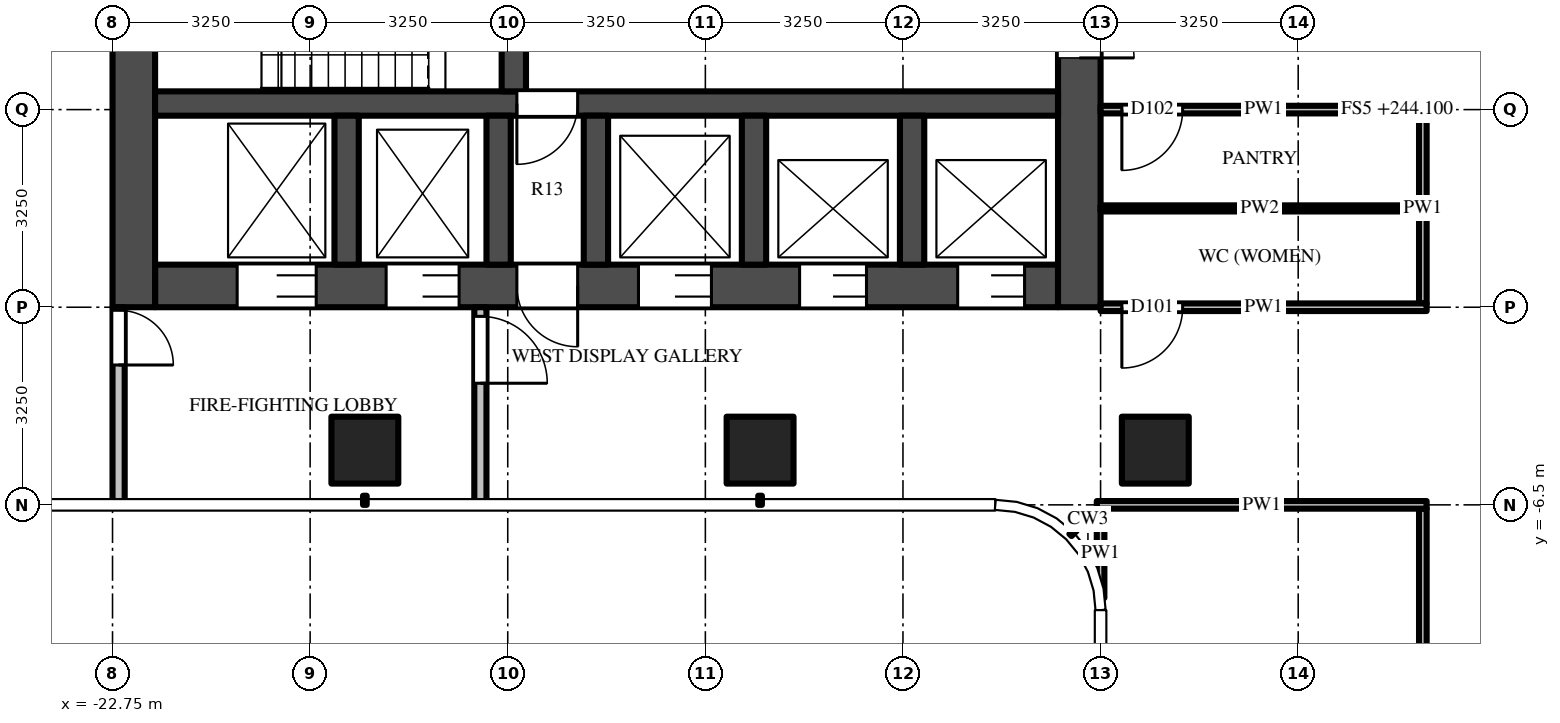
"""IFC4 building model, lengths in metres.
Left out: names, types, materials, properties, quantities, classifications, styles, units other than length and angle.
Written with IfcOpenShell. Run it as: python <this file> out.ifc"""

import sys

from ifc_helpers import new_model, si_unit, direction, frame, frame_2d, origin, origin_2d, place, context, subcontext, project, spatial, rectangle, extrude, source, transform, mapped, element, fill, save


model = new_model("IFC4")
c1 = context("Model", 3, precision=1e-05, world=origin(), true_north=direction((0.0, 1.0)))
c2 = subcontext(c1, "Body", "Model", "MODEL_VIEW")
j1 = project(units=[si_unit("LENGTHUNIT", "METRE"), si_unit("PLANEANGLEUNIT", "RADIAN")], contexts=[c1])
p1 = place(None, origin())
s1 = spatial("IfcSite", under=j1, at=p1, CompositionType="ELEMENT")
p2 = place(p1, origin())
s2 = spatial("IfcBuilding", under=s1, at=p2, CompositionType="ELEMENT")
p3 = place(p2, frame((0.0, 0.0, 244.1)))
s3 = spatial("IfcBuildingStorey", under=s2, at=p3, CompositionType="ELEMENT", Elevation=244.1)
m1 = source(origin(), c2, "Body", "SweptSolid", [
    extrude(rectangle(XDim=1.1, YDim=1.1, at=origin_2d()), origin(), (0.0, 0.0, 1.0), 3.9),
])
for number, where, z_axis, x_axis in (
    (1, (-5.6, -5.6, 0.0), (0.0, 0.0, 1.0), (1.0, 0.0, 0.0)),
    (2, (-12.1, -5.6, 0.0), (0.0, 0.0, 1.0), (1.0, 0.0, 0.0)),
    (3, (-18.6, -5.6, 0.0), (0.0, 0.0, 1.0), (1.0, 0.0, 0.0)),
):
    element("IfcColumn", number, at=place(p3, frame(where, z_axis=z_axis, x_axis=x_axis)), inside=s3, PredefinedType="COLUMN", context=c2, shape_type="MappedRepresentation", body=[
        mapped(m1, transform((0.0, 0.0, 0.0))),
    ])
m2 = source(origin(), c2, "Body", "SweptSolid", [
    extrude(rectangle(XDim=14.85, YDim=0.7, at=frame_2d((7.425, 0.0))), origin(), (0.0, 0.0, 1.0), 3.7),
])
p4 = place(p3, frame((-7.2, -2.9, 0.0), z_axis=(0.0, 0.0, 1.0), x_axis=(-1.0, 0.0, 0.0)))
e4 = element("IfcWall", 4, at=p4, inside=s3, PredefinedType="SHEAR", context=c2, shape_type="MappedRepresentation", body=[
    mapped(m2, transform((0.0, 0.0, 0.0))),
])
m3 = source(origin(), c2, "Body", "SweptSolid", [
    extrude(rectangle(XDim=1.1, YDim=2.1, at=frame_2d((0.55, 1.05))), frame((0.0, 0.36, 0.0), z_axis=(0.0, -1.0, 0.0), x_axis=(1.0, 0.0, 0.0)), (0.0, 0.0, 1.0), 0.72),
])
p5 = place(p4, frame((0.55, 0.0, 0.0)))
e5 = element("IfcOpeningElement", 5, at=p5, cuts=e4, PredefinedType="OPENING", context=c2, shape_type="MappedRepresentation", body=[
    mapped(m3, transform((0.0, 0.0, 0.0))),
])
p6 = place(p4, frame((3.15, 0.0, 0.0)))
e6 = element("IfcOpeningElement", 6, at=p6, cuts=e4, PredefinedType="OPENING", context=c2, shape_type="MappedRepresentation", body=[
    mapped(m3, transform((0.0, 0.0, 0.0))),
])
m4 = source(origin(), c2, "Body", "SweptSolid", [
    extrude(rectangle(XDim=1.2, YDim=2.1, at=frame_2d((0.6, 1.05))), frame((0.0, 0.36, 0.0), z_axis=(0.0, -1.0, 0.0), x_axis=(1.0, 0.0, 0.0)), (0.0, 0.0, 1.0), 0.72),
])
p7 = place(p4, frame((5.7, 0.0, 0.0)))
e7 = element("IfcOpeningElement", 7, at=p7, cuts=e4, PredefinedType="OPENING", context=c2, shape_type="MappedRepresentation", body=[
    mapped(m4, transform((0.0, 0.0, 0.0))),
])
m5 = source(origin(), c2, "Body", "SweptSolid", [
    extrude(rectangle(XDim=1.3, YDim=2.1, at=frame_2d((0.65, 1.05))), frame((0.0, 0.36, 0.0), z_axis=(0.0, -1.0, 0.0), x_axis=(1.0, 0.0, 0.0)), (0.0, 0.0, 1.0), 0.72),
])
p8 = place(p4, frame((12.2, 0.0, 0.0)))
e8 = element("IfcOpeningElement", 8, at=p8, cuts=e4, PredefinedType="OPENING", context=c2, shape_type="MappedRepresentation", body=[
    mapped(m5, transform((0.0, 0.0, 0.0))),
])
p9 = place(p4, frame((9.85, 0.0, 0.0)))
e9 = element("IfcOpeningElement", 9, at=p9, cuts=e4, PredefinedType="OPENING", context=c2, shape_type="MappedRepresentation", body=[
    mapped(m4, transform((0.0, 0.0, 0.0))),
])
m6 = source(origin(), c2, "Body", "SweptSolid", [
    extrude(rectangle(XDim=1.0, YDim=2.1, at=frame_2d((0.5, 1.05))), frame((0.0, 0.36, 0.0), z_axis=(0.0, -1.0, 0.0), x_axis=(1.0, 0.0, 0.0)), (0.0, 0.0, 1.0), 0.72),
])
p10 = place(p4, frame((7.9, 0.0, 0.0)))
e10 = element("IfcOpeningElement", 10, at=p10, cuts=e4, PredefinedType="OPENING", context=c2, shape_type="MappedRepresentation", body=[
    mapped(m6, transform((0.0, 0.0, 0.0))),
])
m7 = source(origin(), c2, "Body", "SweptSolid", [
    extrude(rectangle(XDim=9.05, YDim=0.7, at=frame_2d((4.525, 0.0))), origin(), (0.0, 0.0, 1.0), 3.7),
])
p11 = place(p3, frame((-6.85, 5.8, 0.0), z_axis=(0.0, 0.0, 1.0), x_axis=(0.0, -1.0, 0.0)))
e11 = element("IfcWall", 11, at=p11, inside=s3, PredefinedType="SHEAR", context=c2, shape_type="MappedRepresentation", body=[
    mapped(m7, transform((0.0, 0.0, 0.0))),
])
m8 = source(origin(), c2, "Body", "SweptSolid", [
    extrude(rectangle(XDim=1.8, YDim=2.1, at=frame_2d((0.9, 1.05))), frame((0.0, 0.36, 0.0), z_axis=(0.0, -1.0, 0.0), x_axis=(1.0, 0.0, 0.0)), (0.0, 0.0, 1.0), 0.72),
])
p12 = place(p11, frame((3.15, 0.0, 0.0)))
e12 = element("IfcOpeningElement", 12, at=p12, cuts=e11, PredefinedType="OPENING", context=c2, shape_type="MappedRepresentation", body=[
    mapped(m8, transform((0.0, 0.0, 0.0))),
])
p13 = place(p3, frame((-22.4, 5.8, 0.0), z_axis=(0.0, 0.0, 1.0), x_axis=(0.0, -1.0, 0.0)))
e13 = element("IfcWall", 13, at=p13, inside=s3, PredefinedType="SHEAR", context=c2, shape_type="MappedRepresentation", body=[
    mapped(m7, transform((0.0, 0.0, 0.0))),
])
m9 = source(origin(), c2, "Body", "SweptSolid", [
    extrude(rectangle(XDim=14.85, YDim=0.4, at=frame_2d((7.425, 0.0))), origin(), (0.0, 0.0, 1.0), 3.7),
])
p14 = place(p3, frame((-7.2, 0.1, 0.0), z_axis=(0.0, 0.0, 1.0), x_axis=(-1.0, 0.0, 0.0)))
e14 = element("IfcWall", 14, at=p14, inside=s3, PredefinedType="SHEAR", context=c2, shape_type="MappedRepresentation", body=[
    mapped(m9, transform((0.0, 0.0, 0.0))),
])
m10 = source(origin(), c2, "Body", "SweptSolid", [
    extrude(rectangle(XDim=1.0, YDim=2.1, at=frame_2d((0.5, 1.05))), frame((0.0, 0.21, 0.0), z_axis=(0.0, -1.0, 0.0), x_axis=(1.0, 0.0, 0.0)), (0.0, 0.0, 1.0), 0.42),
])
p15 = place(p14, frame((7.9, 0.0, 0.0)))
e15 = element("IfcOpeningElement", 15, at=p15, cuts=e14, PredefinedType="OPENING", context=c2, shape_type="MappedRepresentation", body=[
    mapped(m10, transform((0.0, 0.0, 0.0))),
])
m11 = source(origin(), c2, "Body", "SweptSolid", [
    extrude(rectangle(XDim=5.5, YDim=0.4, at=frame_2d((2.75, 0.0))), origin(), (0.0, 0.0, 1.0), 3.7),
])
p16 = place(p3, frame((-16.15, 5.8, 0.0), z_axis=(0.0, 0.0, 1.0), x_axis=(0.0, -1.0, 0.0)))
e16 = element("IfcWall", 16, at=p16, inside=s3, PredefinedType="SHEAR", context=c2, shape_type="MappedRepresentation", body=[
    mapped(m11, transform((0.0, 0.0, 0.0))),
])
m12 = source(origin(), c2, "Body", "SweptSolid", [
    extrude(rectangle(XDim=1.1, YDim=2.1, at=frame_2d((0.55, 1.05))), frame((0.0, 0.21, 0.0), z_axis=(0.0, -1.0, 0.0), x_axis=(1.0, 0.0, 0.0)), (0.0, 0.0, 1.0), 0.42),
])
p17 = place(p16, frame((0.725, 0.0, 0.0)))
e17 = element("IfcOpeningElement", 17, at=p17, cuts=e16, PredefinedType="OPENING", context=c2, shape_type="MappedRepresentation", body=[
    mapped(m12, transform((0.0, 0.0, 0.0))),
])
p18 = place(p16, frame((3.675, 0.0, 0.0)))
e18 = element("IfcOpeningElement", 18, at=p18, cuts=e16, PredefinedType="OPENING", context=c2, shape_type="MappedRepresentation", body=[
    mapped(m12, transform((0.0, 0.0, 0.0))),
])
m13 = source(origin(), c2, "Body", "SweptSolid", [
    extrude(rectangle(XDim=2.45, YDim=0.4, at=frame_2d((1.225, 0.0))), origin(), (0.0, 0.0, 1.0), 3.7),
])
for number, where, z_axis, x_axis in (
    (19, (-9.6, -0.1, 0.0), (0.0, 0.0, 1.0), (0.0, -1.0, 0.0)),
    (20, (-12.2, -0.1, 0.0), (0.0, 0.0, 1.0), (0.0, -1.0, 0.0)),
    (21, (-14.8, -0.1, 0.0), (0.0, 0.0, 1.0), (0.0, -1.0, 0.0)),
    (22, (-16.4, -0.1, 0.0), (0.0, 0.0, 1.0), (0.0, -1.0, 0.0)),
    (23, (-18.9, -0.1, 0.0), (0.0, 0.0, 1.0), (0.0, -1.0, 0.0)),
):
    element("IfcWall", number, at=place(p3, frame(where, z_axis=z_axis, x_axis=x_axis)), inside=s3, PredefinedType="SHEAR", context=c2, shape_type="MappedRepresentation", body=[
        mapped(m13, transform((0.0, 0.0, 0.0))),
    ])
m14 = source(origin(), c2, "Body", "SweptSolid", [
    extrude(rectangle(XDim=3.25, YDim=0.2, at=frame_2d((1.625, 0.0))), origin(), (0.0, 0.0, 1.0), 3.7),
])
p19 = place(p3, frame((-16.7, -3.25, 0.0), z_axis=(0.0, 0.0, 1.0), x_axis=(0.0, -1.0, 0.0)))
e24 = element("IfcWall", 24, at=p19, inside=s3, PredefinedType="PARTITIONING", context=c2, shape_type="MappedRepresentation", body=[
    mapped(m14, transform((0.0, 0.0, 0.0))),
])
m15 = source(origin(), c2, "Body", "SweptSolid", [
    extrude(rectangle(XDim=1.1, YDim=2.1, at=frame_2d((0.55, 1.05))), frame((0.0, 0.11, 0.0), z_axis=(0.0, -1.0, 0.0), x_axis=(1.0, 0.0, 0.0)), (0.0, 0.0, 1.0), 0.22),
])
p20 = place(p19, frame((0.15, 0.0, 0.0)))
e25 = element("IfcOpeningElement", 25, at=p20, cuts=e24, PredefinedType="OPENING", context=c2, shape_type="MappedRepresentation", body=[
    mapped(m15, transform((0.0, 0.0, 0.0))),
])
p21 = place(p3, frame((-22.65, -3.25, 0.0), z_axis=(0.0, 0.0, 1.0), x_axis=(0.0, -1.0, 0.0)))
e26 = element("IfcWall", 26, at=p21, inside=s3, PredefinedType="PARTITIONING", context=c2, shape_type="MappedRepresentation", body=[
    mapped(m14, transform((0.0, 0.0, 0.0))),
])
m16 = source(origin(), c2, "Body", "SweptSolid", [
    extrude(rectangle(XDim=0.9, YDim=2.1, at=frame_2d((0.45, 1.05))), frame((0.0, 0.11, 0.0), z_axis=(0.0, -1.0, 0.0), x_axis=(1.0, 0.0, 0.0)), (0.0, 0.0, 1.0), 0.22),
])
p22 = place(p21, frame((0.05, 0.0, 0.0)))
e27 = element("IfcOpeningElement", 27, at=p22, cuts=e26, PredefinedType="OPENING", context=c2, shape_type="MappedRepresentation", body=[
    mapped(m16, transform((0.0, 0.0, 0.0))),
])
m17 = source(origin(), c2, "Body", "SweptSolid", [
    extrude(rectangle(XDim=1.469, YDim=0.125, at=frame_2d((0.734, 0.0))), origin(), (0.0, 0.0, 1.0), 3.7),
])
p23 = place(p3, frame((-6.5, -6.562, 0.0), z_axis=(0.0, 0.0, 1.0), x_axis=(0.0, -1.0, 0.0)))
e28 = element("IfcWall", 28, at=p23, inside=s3, PredefinedType="PARTITIONING", context=c2, shape_type="MappedRepresentation", body=[
    mapped(m17, transform((0.0, 0.0, 0.0))),
])
m18 = source(origin(), c2, "Body", "SweptSolid", [
    extrude(rectangle(XDim=5.475, YDim=0.125, at=frame_2d((2.738, 0.0))), origin(), (0.0, 0.0, 1.0), 2.997),
])
p24 = place(p3, frame((-1.2, -6.562, 0.0), z_axis=(0.0, 0.0, 1.0), x_axis=(0.0, -1.0, 0.0)))
e29 = element("IfcWall", 29, at=p24, inside=s3, PredefinedType="PARTITIONING", context=c2, shape_type="MappedRepresentation", body=[
    mapped(m18, transform((0.0, 0.0, 0.0))),
])
m19 = source(origin(), c2, "Body", "SweptSolid", [
    extrude(rectangle(XDim=3.125, YDim=0.125, at=frame_2d((1.562, 0.0))), origin(), (0.0, 0.0, 1.0), 3.068),
])
p25 = place(p3, frame((-1.2, -0.062, 0.0), z_axis=(0.0, 0.0, 1.0), x_axis=(0.0, -1.0, 0.0)))
e30 = element("IfcWall", 30, at=p25, inside=s3, PredefinedType="PARTITIONING", context=c2, shape_type="MappedRepresentation", body=[
    mapped(m19, transform((0.0, 0.0, 0.0))),
])
m20 = source(origin(), c2, "Body", "SweptSolid", [
    extrude(rectangle(XDim=5.425, YDim=0.125, at=frame_2d((2.712, 0.0))), origin(), (0.0, 0.0, 1.0), 2.78),
])
p26 = place(p3, frame((-1.137, -6.5, 0.0), z_axis=(0.0, 0.0, 1.0), x_axis=(-1.0, 0.0, 0.0)))
e31 = element("IfcWall", 31, at=p26, inside=s3, PredefinedType="PARTITIONING", context=c2, shape_type="MappedRepresentation", body=[
    mapped(m20, transform((0.0, 0.0, 0.0))),
])
m21 = source(origin(), c2, "Body", "SweptSolid", [
    extrude(rectangle(XDim=5.363, YDim=0.125, at=frame_2d((2.681, 0.0))), origin(), (0.0, 0.0, 1.0), 2.997),
])
p27 = place(p3, frame((-1.137, -3.25, 0.0), z_axis=(0.0, 0.0, 1.0), x_axis=(-1.0, 0.0, 0.0)))
e32 = element("IfcWall", 32, at=p27, inside=s3, PredefinedType="PARTITIONING", context=c2, shape_type="MappedRepresentation", body=[
    mapped(m21, transform((0.0, 0.0, 0.0))),
])
m22 = source(origin(), c2, "Body", "SweptSolid", [
    extrude(rectangle(XDim=1.0, YDim=2.1, at=frame_2d((0.5, 1.05))), frame((0.0, 0.073, 0.0), z_axis=(0.0, -1.0, 0.0), x_axis=(1.0, 0.0, 0.0)), (0.0, 0.0, 1.0), 0.145),
])
p28 = place(p27, frame((4.012, 0.0, 0.0)))
e33 = element("IfcOpeningElement", 33, at=p28, cuts=e32, PredefinedType="OPENING", context=c2, shape_type="MappedRepresentation", body=[
    mapped(m22, transform((0.0, 0.0, 0.0))),
])
m23 = source(origin(), c2, "Body", "SweptSolid", [
    extrude(rectangle(XDim=5.238, YDim=0.1, at=frame_2d((2.619, 0.0))), origin(), (0.0, 0.0, 1.0), 2.997),
])
p29 = place(p3, frame((-6.5, -1.625, 0.0), z_axis=(0.0, 0.0, 1.0), x_axis=(1.0, 0.0, 0.0)))
e34 = element("IfcWall", 34, at=p29, inside=s3, PredefinedType="PARTITIONING", context=c2, shape_type="MappedRepresentation", body=[
    mapped(m23, transform((0.0, 0.0, 0.0))),
])
p30 = place(p3, frame((-1.137, 0.0, 0.0), z_axis=(0.0, 0.0, 1.0), x_axis=(-1.0, 0.0, 0.0)))
e35 = element("IfcWall", 35, at=p30, inside=s3, PredefinedType="PARTITIONING", context=c2, shape_type="MappedRepresentation", body=[
    mapped(m21, transform((0.0, 0.0, 0.0))),
])
p31 = place(p30, frame((4.012, 0.0, 0.0)))
e36 = element("IfcOpeningElement", 36, at=p31, cuts=e35, PredefinedType="OPENING", context=c2, shape_type="MappedRepresentation", body=[
    mapped(m22, transform((0.0, 0.0, 0.0))),
])
m24 = source(origin(), c2, "Body", "SweptSolid", [
    extrude(rectangle(XDim=1.1, YDim=2.1, at=frame_2d((0.55, 1.05))), frame((0.0, -0.275, 0.0), z_axis=(0.0, -1.0, 0.0), x_axis=(1.0, 0.0, 0.0)), (0.0, 0.0, 1.0), 0.05),
])
p32 = place(p5, origin())
e37 = element("IfcDoor", 37, at=p32, inside=s3, OperationType="DOUBLE_DOOR_SLIDING", PredefinedType="DOOR", context=c2, shape_type="MappedRepresentation", body=[
    mapped(m24, transform((0.0, 0.0, 0.0))),
])
fill(e5, e37)
p33 = place(p6, origin())
e38 = element("IfcDoor", 38, at=p33, inside=s3, OperationType="DOUBLE_DOOR_SLIDING", PredefinedType="DOOR", context=c2, shape_type="MappedRepresentation", body=[
    mapped(m24, transform((0.0, 0.0, 0.0))),
])
fill(e6, e38)
m25 = source(origin(), c2, "Body", "SweptSolid", [
    extrude(rectangle(XDim=1.2, YDim=2.1, at=frame_2d((0.6, 1.05))), frame((0.0, -0.275, 0.0), z_axis=(0.0, -1.0, 0.0), x_axis=(1.0, 0.0, 0.0)), (0.0, 0.0, 1.0), 0.05),
])
p34 = place(p7, origin())
e39 = element("IfcDoor", 39, at=p34, inside=s3, OperationType="DOUBLE_DOOR_SLIDING", PredefinedType="DOOR", context=c2, shape_type="MappedRepresentation", body=[
    mapped(m25, transform((0.0, 0.0, 0.0))),
])
fill(e7, e39)
m26 = source(origin(), c2, "Body", "SweptSolid", [
    extrude(rectangle(XDim=1.3, YDim=2.1, at=frame_2d((0.65, 1.05))), frame((0.0, -0.275, 0.0), z_axis=(0.0, -1.0, 0.0), x_axis=(1.0, 0.0, 0.0)), (0.0, 0.0, 1.0), 0.05),
])
p35 = place(p8, origin())
e40 = element("IfcDoor", 40, at=p35, inside=s3, OperationType="DOUBLE_DOOR_SLIDING", PredefinedType="DOOR", context=c2, shape_type="MappedRepresentation", body=[
    mapped(m26, transform((0.0, 0.0, 0.0))),
])
fill(e8, e40)
p36 = place(p9, origin())
e41 = element("IfcDoor", 41, at=p36, inside=s3, OperationType="DOUBLE_DOOR_SLIDING", PredefinedType="DOOR", context=c2, shape_type="MappedRepresentation", body=[
    mapped(m25, transform((0.0, 0.0, 0.0))),
])
fill(e9, e41)
m27 = source(origin(), c2, "Body", "SweptSolid", [
    extrude(rectangle(XDim=1.8, YDim=2.1, at=frame_2d((0.9, 1.05))), frame((0.0, -0.275, 0.0), z_axis=(0.0, -1.0, 0.0), x_axis=(1.0, 0.0, 0.0)), (0.0, 0.0, 1.0), 0.05),
])
p37 = place(p12, origin())
e42 = element("IfcDoor", 42, at=p37, inside=s3, OperationType="DOUBLE_DOOR_SINGLE_SWING", PredefinedType="DOOR", context=c2, shape_type="MappedRepresentation", body=[
    mapped(m27, transform((0.0, 0.0, 0.0))),
])
fill(e12, e42)
m28 = source(origin(), c2, "Body", "SweptSolid", [
    extrude(rectangle(XDim=1.0, YDim=2.1, at=frame_2d((0.5, 1.05))), frame((0.0, 0.025, 0.0), z_axis=(0.0, -1.0, 0.0), x_axis=(1.0, 0.0, 0.0)), (0.0, 0.0, 1.0), 0.05),
])
p38 = place(p15, origin())
e43 = element("IfcDoor", 43, at=p38, inside=s3, OperationType="SINGLE_SWING_RIGHT", PredefinedType="DOOR", context=c2, shape_type="MappedRepresentation", body=[
    mapped(m28, transform((0.0, 0.0, 0.0))),
])
fill(e15, e43)
m29 = source(origin(), c2, "Body", "SweptSolid", [
    extrude(rectangle(XDim=1.0, YDim=2.1, at=frame_2d((0.5, 1.05))), frame((0.0, -0.275, 0.0), z_axis=(0.0, -1.0, 0.0), x_axis=(1.0, 0.0, 0.0)), (0.0, 0.0, 1.0), 0.05),
])
p39 = place(p10, origin())
e44 = element("IfcDoor", 44, at=p39, inside=s3, OperationType="SINGLE_SWING_LEFT", PredefinedType="DOOR", context=c2, shape_type="MappedRepresentation", body=[
    mapped(m29, transform((0.0, 0.0, 0.0))),
])
fill(e10, e44)
m30 = source(origin(), c2, "Body", "SweptSolid", [
    extrude(rectangle(XDim=1.1, YDim=2.1, at=frame_2d((0.55, 1.05))), frame((0.0, 0.025, 0.0), z_axis=(0.0, -1.0, 0.0), x_axis=(1.0, 0.0, 0.0)), (0.0, 0.0, 1.0), 0.05),
])
p40 = place(p20, origin())
e45 = element("IfcDoor", 45, at=p40, inside=s3, OperationType="SINGLE_SWING_RIGHT", PredefinedType="DOOR", context=c2, shape_type="MappedRepresentation", body=[
    mapped(m30, transform((0.0, 0.0, 0.0))),
])
fill(e25, e45)
m31 = source(origin(), c2, "Body", "SweptSolid", [
    extrude(rectangle(XDim=0.9, YDim=2.1, at=frame_2d((0.45, 1.05))), frame((0.0, 0.025, 0.0), z_axis=(0.0, -1.0, 0.0), x_axis=(1.0, 0.0, 0.0)), (0.0, 0.0, 1.0), 0.05),
])
p41 = place(p22, origin())
e46 = element("IfcDoor", 46, at=p41, inside=s3, OperationType="SINGLE_SWING_RIGHT", PredefinedType="DOOR", context=c2, shape_type="MappedRepresentation", body=[
    mapped(m31, transform((0.0, 0.0, 0.0))),
])
fill(e27, e46)
p42 = place(p28, origin())
e47 = element("IfcDoor", 47, at=p42, inside=s3, OperationType="SINGLE_SWING_RIGHT", PredefinedType="DOOR", context=c2, shape_type="MappedRepresentation", body=[
    mapped(m28, transform((0.0, 0.0, 0.0))),
])
fill(e33, e47)
p43 = place(p31, origin())
e48 = element("IfcDoor", 48, at=p43, inside=s3, OperationType="SINGLE_SWING_RIGHT", PredefinedType="DOOR", context=c2, shape_type="MappedRepresentation", body=[
    mapped(m28, transform((0.0, 0.0, 0.0))),
])
fill(e36, e48)
save(model, sys.argv[1])
